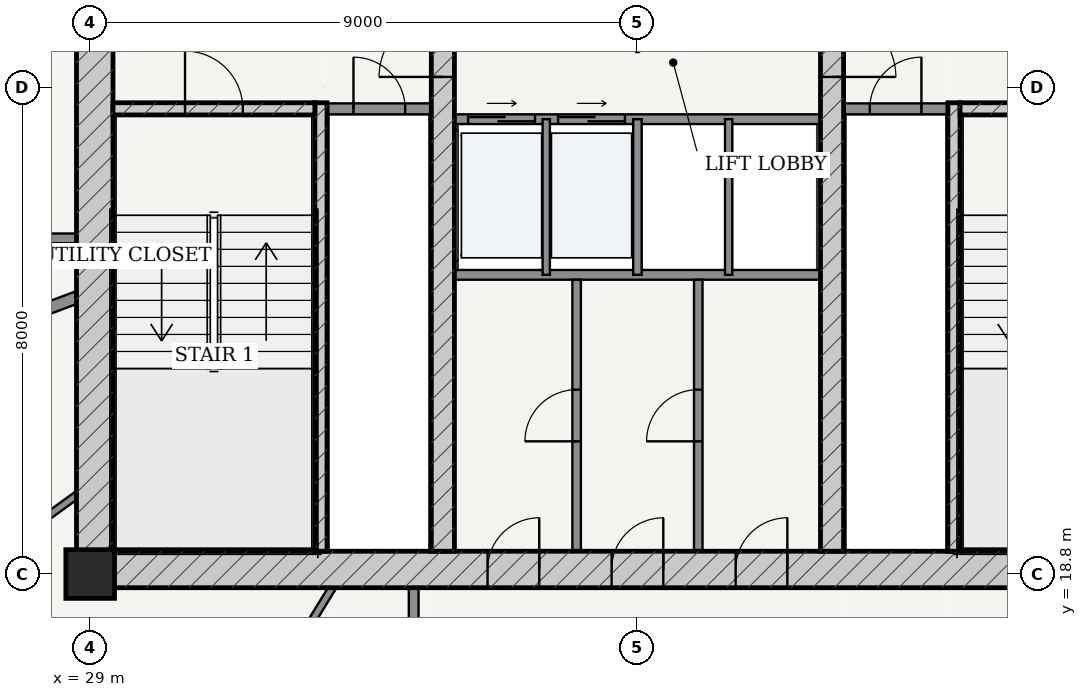
"""IFC4 building model, lengths in metres.
Left out: names, types, materials, properties, quantities, classifications, styles, units other than length and angle.
Written with IfcOpenShell. Run it as: python <this file> out.ifc"""

import sys

from ifc_helpers import new_model, si_unit, direction, frame, frame_2d, origin, origin_2d, place, context, subcontext, project, spatial, rectangle, extrude, source, transform, mapped, element, fill, save


model = new_model("IFC4")
c1 = context("Model", 3, precision=1e-05, world=origin(), true_north=direction((-0.2419218956, 0.970295726276)))
c2 = subcontext(c1, "Body", "Model", "MODEL_VIEW")
j1 = project(units=[si_unit("LENGTHUNIT", "METRE"), si_unit("PLANEANGLEUNIT", "RADIAN")], contexts=[c1])
p1 = place(None, origin())
s1 = spatial("IfcSite", under=j1, at=p1, CompositionType="ELEMENT")
p2 = place(p1, origin())
s2 = spatial("IfcBuilding", under=s1, at=p2, CompositionType="ELEMENT")
p3 = place(p2, frame((0.0, 0.0, 209.7)))
s3 = spatial("IfcBuildingStorey", under=s2, at=p3, CompositionType="ELEMENT", Elevation=209.7)
p4 = place(p3, frame((29.0, 18.8, 0.0), z_axis=(0.0, 0.0, 1.0), x_axis=(1.0, 0.0, 0.0)))
e1 = element("IfcColumn", 1, at=p4, inside=s3, PredefinedType="COLUMN", context=c2, shape_type="SweptSolid", body=[
    extrude(rectangle(XDim=0.8, YDim=0.8, at=origin_2d()), origin(), (0.0, 0.0, 1.0), 3.7),
])
p5 = place(p3, frame((28.775, 18.875, 0.0), z_axis=(0.0, 0.0, 1.0), x_axis=(1.0, 0.0, 0.0)))
e2 = element("IfcWall", 2, at=p5, inside=s3, PredefinedType="SHEAR", context=c2, shape_type="SweptSolid", body=[
    extrude(rectangle(XDim=18.45, YDim=0.6, at=frame_2d((9.225, 0.0))), origin(), (0.0, 0.0, 1.0), 3.435),
])
p6 = place(p5, frame((6.76, 0.0, 0.0)))
e3 = element("IfcOpeningElement", 3, at=p6, cuts=e2, PredefinedType="OPENING", context=c2, shape_type="SweptSolid", body=[
    extrude(rectangle(XDim=0.85, YDim=2.1, at=frame_2d((0.425, 1.05))), frame((0.0, 0.31, 0.0), z_axis=(0.0, -1.0, 0.0), x_axis=(1.0, 0.0, 0.0)), (0.0, 0.0, 1.0), 0.62),
])
p7 = place(p5, frame((8.8, 0.0, 0.0)))
e4 = element("IfcOpeningElement", 4, at=p7, cuts=e2, PredefinedType="OPENING", context=c2, shape_type="SweptSolid", body=[
    extrude(rectangle(XDim=0.85, YDim=2.1, at=frame_2d((0.425, 1.05))), frame((0.0, 0.31, 0.0), z_axis=(0.0, -1.0, 0.0), x_axis=(1.0, 0.0, 0.0)), (0.0, 0.0, 1.0), 0.62),
])
p8 = place(p5, frame((10.84, 0.0, 0.0)))
e5 = element("IfcOpeningElement", 5, at=p8, cuts=e2, PredefinedType="OPENING", context=c2, shape_type="SweptSolid", body=[
    extrude(rectangle(XDim=0.85, YDim=2.1, at=frame_2d((0.425, 1.05))), frame((0.0, 0.31, 0.0), z_axis=(0.0, -1.0, 0.0), x_axis=(1.0, 0.0, 0.0)), (0.0, 0.0, 1.0), 0.62),
])
p9 = place(p3, frame((29.075, 19.175, 0.0), z_axis=(0.0, 0.0, 1.0), x_axis=(0.0, 1.0, 0.0)))
e6 = element("IfcWall", 6, at=p9, inside=s3, PredefinedType="SHEAR", context=c2, shape_type="SweptSolid", body=[
    extrude(rectangle(XDim=15.25, YDim=0.6, at=frame_2d((7.625, 0.0))), origin(), (0.0, 0.0, 1.0), 3.435),
])
p10 = place(p9, frame((9.875, 0.0, 0.0)))
e7 = element("IfcOpeningElement", 7, at=p10, cuts=e6, PredefinedType="OPENING", context=c2, shape_type="SweptSolid", body=[
    extrude(rectangle(XDim=1.5, YDim=2.2, at=frame_2d((0.75, 1.1))), frame((0.0, 0.31, 0.0), z_axis=(0.0, -1.0, 0.0), x_axis=(1.0, 0.0, 0.0)), (0.0, 0.0, 1.0), 0.62),
])
p11 = place(p3, frame((32.795, 19.175, 0.0), z_axis=(0.0, 0.0, 1.0), x_axis=(0.0, 1.0, 0.0)))
e8 = element("IfcWall", 8, at=p11, inside=s3, PredefinedType="SOLIDWALL", context=c2, shape_type="SweptSolid", body=[
    extrude(rectangle(XDim=7.375, YDim=0.2, at=frame_2d((3.688, 0.0))), origin(), (0.0, 0.0, 1.0), 3.435),
])
p12 = place(p3, frame((29.375, 26.45, 0.0), z_axis=(0.0, 0.0, 1.0), x_axis=(1.0, 0.0, 0.0)))
e9 = element("IfcWall", 9, at=p12, inside=s3, PredefinedType="SOLIDWALL", context=c2, shape_type="SweptSolid", body=[
    extrude(rectangle(XDim=3.32, YDim=0.2, at=frame_2d((1.66, 0.0))), origin(), (0.0, 0.0, 1.0), 3.435),
])
p13 = place(p12, frame((1.185, 0.0, 0.0)))
e10 = element("IfcOpeningElement", 10, at=p13, cuts=e9, PredefinedType="OPENING", context=c2, shape_type="SweptSolid", body=[
    extrude(rectangle(XDim=0.95, YDim=2.15, at=frame_2d((0.475, 1.075))), frame((0.0, 0.11, 0.0), z_axis=(0.0, -1.0, 0.0), x_axis=(1.0, 0.0, 0.0)), (0.0, 0.0, 1.0), 0.22),
])
p14 = place(p3, frame((43.205, 19.175, 0.0), z_axis=(0.0, 0.0, 1.0), x_axis=(0.0, 1.0, 0.0)))
e11 = element("IfcWall", 11, at=p14, inside=s3, PredefinedType="SOLIDWALL", context=c2, shape_type="SweptSolid", body=[
    extrude(rectangle(XDim=7.375, YDim=0.2, at=frame_2d((3.688, 0.0))), origin(), (0.0, 0.0, 1.0), 3.435),
])
p15 = place(p3, frame((43.305, 26.45, 0.0), z_axis=(0.0, 0.0, 1.0), x_axis=(1.0, 0.0, 0.0)))
e12 = element("IfcWall", 12, at=p15, inside=s3, PredefinedType="SOLIDWALL", context=c2, shape_type="SweptSolid", body=[
    extrude(rectangle(XDim=3.32, YDim=0.2, at=frame_2d((1.66, 0.0))), origin(), (0.0, 0.0, 1.0), 3.435),
])
p16 = place(p15, frame((1.185, 0.0, 0.0)))
e13 = element("IfcOpeningElement", 13, at=p16, cuts=e12, PredefinedType="OPENING", context=c2, shape_type="SweptSolid", body=[
    extrude(rectangle(XDim=0.95, YDim=2.15, at=frame_2d((0.475, 1.075))), frame((0.0, 0.11, 0.0), z_axis=(0.0, -1.0, 0.0), x_axis=(1.0, 0.0, 0.0)), (0.0, 0.0, 1.0), 0.22),
])
p17 = place(p3, frame((34.8, 19.175, 0.0), z_axis=(0.0, 0.0, 1.0), x_axis=(0.0, 1.0, 0.0)))
e14 = element("IfcWall", 14, at=p17, inside=s3, PredefinedType="SHEAR", context=c2, shape_type="SweptSolid", body=[
    extrude(rectangle(XDim=15.25, YDim=0.38, at=frame_2d((7.625, 0.0))), origin(), (0.0, 0.0, 1.0), 3.435),
])
p18 = place(p17, frame((7.8, 0.0, 0.0)))
e15 = element("IfcOpeningElement", 15, at=p18, cuts=e14, PredefinedType="OPENING", context=c2, shape_type="SweptSolid", body=[
    extrude(rectangle(XDim=1.05, YDim=2.15, at=frame_2d((0.525, 1.075))), frame((0.0, 0.2, 0.0), z_axis=(0.0, -1.0, 0.0), x_axis=(1.0, 0.0, 0.0)), (0.0, 0.0, 1.0), 0.4),
])
p19 = place(p3, frame((41.2, 19.175, 0.0), z_axis=(0.0, 0.0, 1.0), x_axis=(0.0, 1.0, 0.0)))
e16 = element("IfcWall", 16, at=p19, inside=s3, PredefinedType="SHEAR", context=c2, shape_type="SweptSolid", body=[
    extrude(rectangle(XDim=15.25, YDim=0.38, at=frame_2d((7.625, 0.0))), origin(), (0.0, 0.0, 1.0), 3.435),
])
p20 = place(p19, frame((7.8, 0.0, 0.0)))
e17 = element("IfcOpeningElement", 17, at=p20, cuts=e16, PredefinedType="OPENING", context=c2, shape_type="SweptSolid", body=[
    extrude(rectangle(XDim=1.05, YDim=2.15, at=frame_2d((0.525, 1.075))), frame((0.0, 0.2, 0.0), z_axis=(0.0, -1.0, 0.0), x_axis=(1.0, 0.0, 0.0)), (0.0, 0.0, 1.0), 0.4),
])
p21 = place(p3, frame((32.9, 26.45, 0.0), z_axis=(0.0, 0.0, 1.0), x_axis=(1.0, 0.0, 0.0)))
e18 = element("IfcWall", 18, at=p21, inside=s3, PredefinedType="PARTITIONING", context=c2, shape_type="SweptSolid", body=[
    extrude(rectangle(XDim=1.71, YDim=0.18, at=frame_2d((0.855, 0.0))), origin(), (0.0, 0.0, 1.0), 3.435),
])
p22 = place(p21, frame((0.43, 0.0, 0.0)))
e19 = element("IfcOpeningElement", 19, at=p22, cuts=e18, PredefinedType="OPENING", context=c2, shape_type="SweptSolid", body=[
    extrude(rectangle(XDim=0.85, YDim=2.1, at=frame_2d((0.425, 1.05))), frame((0.0, 0.1, 0.0), z_axis=(0.0, -1.0, 0.0), x_axis=(1.0, 0.0, 0.0)), (0.0, 0.0, 1.0), 0.2),
])
p23 = place(p3, frame((41.39, 26.45, 0.0), z_axis=(0.0, 0.0, 1.0), x_axis=(1.0, 0.0, 0.0)))
e20 = element("IfcWall", 20, at=p23, inside=s3, PredefinedType="PARTITIONING", context=c2, shape_type="SweptSolid", body=[
    extrude(rectangle(XDim=1.71, YDim=0.18, at=frame_2d((0.855, 0.0))), origin(), (0.0, 0.0, 1.0), 3.435),
])
p24 = place(p23, frame((0.43, 0.0, 0.0)))
e21 = element("IfcOpeningElement", 21, at=p24, cuts=e20, PredefinedType="OPENING", context=c2, shape_type="SweptSolid", body=[
    extrude(rectangle(XDim=0.85, YDim=2.1, at=frame_2d((0.425, 1.05))), frame((0.0, 0.1, 0.0), z_axis=(0.0, -1.0, 0.0), x_axis=(1.0, 0.0, 0.0)), (0.0, 0.0, 1.0), 0.2),
])
p25 = place(p3, frame((34.99, 26.28, 0.0), z_axis=(0.0, 0.0, 1.0), x_axis=(1.0, 0.0, 0.0)))
e22 = element("IfcWall", 22, at=p25, inside=s3, PredefinedType="PARTITIONING", context=c2, shape_type="SweptSolid", body=[
    extrude(rectangle(XDim=6.02, YDim=0.16, at=frame_2d((3.01, 0.0))), origin(), (0.0, 0.0, 1.0), 3.435),
])
p26 = place(p25, frame((0.225, 0.0, 0.0)))
e23 = element("IfcOpeningElement", 23, at=p26, cuts=e22, PredefinedType="OPENING", context=c2, shape_type="SweptSolid", body=[
    extrude(rectangle(XDim=1.1, YDim=2.2, at=frame_2d((0.55, 1.1))), frame((0.0, 0.09, 0.0), z_axis=(0.0, -1.0, 0.0), x_axis=(1.0, 0.0, 0.0)), (0.0, 0.0, 1.0), 0.18),
])
p27 = place(p25, frame((1.705, 0.0, 0.0)))
e24 = element("IfcOpeningElement", 24, at=p27, cuts=e22, PredefinedType="OPENING", context=c2, shape_type="SweptSolid", body=[
    extrude(rectangle(XDim=1.1, YDim=2.2, at=frame_2d((0.55, 1.1))), frame((0.0, 0.09, 0.0), z_axis=(0.0, -1.0, 0.0), x_axis=(1.0, 0.0, 0.0)), (0.0, 0.0, 1.0), 0.18),
])
p28 = place(p3, frame((34.99, 23.72, 0.0), z_axis=(0.0, 0.0, 1.0), x_axis=(1.0, 0.0, 0.0)))
e25 = element("IfcWall", 25, at=p28, inside=s3, PredefinedType="PARTITIONING", context=c2, shape_type="SweptSolid", body=[
    extrude(rectangle(XDim=6.02, YDim=0.16, at=frame_2d((3.01, 0.0))), origin(), (0.0, 0.0, 1.0), 3.435),
])
p29 = place(p3, frame((36.5, 23.72, 0.0), z_axis=(0.0, 0.0, 1.0), x_axis=(0.0, 1.0, 0.0)))
e26 = element("IfcWall", 26, at=p29, inside=s3, PredefinedType="PARTITIONING", context=c2, shape_type="SweptSolid", body=[
    extrude(rectangle(XDim=2.56, YDim=0.12, at=frame_2d((1.28, 0.0))), origin(), (0.0, 0.0, 1.0), 3.435),
])
p30 = place(p3, frame((38.0, 23.72, 0.0), z_axis=(0.0, 0.0, 1.0), x_axis=(0.0, 1.0, 0.0)))
e27 = element("IfcWall", 27, at=p30, inside=s3, PredefinedType="PARTITIONING", context=c2, shape_type="SweptSolid", body=[
    extrude(rectangle(XDim=2.56, YDim=0.14, at=frame_2d((1.28, 0.0))), origin(), (0.0, 0.0, 1.0), 3.435),
])
p31 = place(p3, frame((39.5, 23.72, 0.0), z_axis=(0.0, 0.0, 1.0), x_axis=(0.0, 1.0, 0.0)))
e28 = element("IfcWall", 28, at=p31, inside=s3, PredefinedType="PARTITIONING", context=c2, shape_type="SweptSolid", body=[
    extrude(rectangle(XDim=2.56, YDim=0.12, at=frame_2d((1.28, 0.0))), origin(), (0.0, 0.0, 1.0), 3.435),
])
p32 = place(p3, frame((37.0, 19.175, 0.0), z_axis=(0.0, 0.0, 1.0), x_axis=(0.0, 1.0, 0.0)))
e29 = element("IfcWall", 29, at=p32, inside=s3, PredefinedType="PARTITIONING", context=c2, shape_type="SweptSolid", body=[
    extrude(rectangle(XDim=4.465, YDim=0.14, at=frame_2d((2.232, 0.0))), origin(), (0.0, 0.0, 1.0), 3.435),
])
p33 = place(p32, frame((1.808, 0.0, 0.0)))
e30 = element("IfcOpeningElement", 30, at=p33, cuts=e29, PredefinedType="OPENING", context=c2, shape_type="SweptSolid", body=[
    extrude(rectangle(XDim=0.85, YDim=2.1, at=frame_2d((0.425, 1.05))), frame((0.0, 0.08, 0.0), z_axis=(0.0, -1.0, 0.0), x_axis=(1.0, 0.0, 0.0)), (0.0, 0.0, 1.0), 0.16),
])
p34 = place(p3, frame((39.0, 19.175, 0.0), z_axis=(0.0, 0.0, 1.0), x_axis=(0.0, 1.0, 0.0)))
e31 = element("IfcWall", 31, at=p34, inside=s3, PredefinedType="PARTITIONING", context=c2, shape_type="SweptSolid", body=[
    extrude(rectangle(XDim=4.465, YDim=0.14, at=frame_2d((2.232, 0.0))), origin(), (0.0, 0.0, 1.0), 3.435),
])
p35 = place(p34, frame((1.808, 0.0, 0.0)))
e32 = element("IfcOpeningElement", 32, at=p35, cuts=e31, PredefinedType="OPENING", context=c2, shape_type="SweptSolid", body=[
    extrude(rectangle(XDim=0.85, YDim=2.1, at=frame_2d((0.425, 1.05))), frame((0.0, 0.08, 0.0), z_axis=(0.0, -1.0, 0.0), x_axis=(1.0, 0.0, 0.0)), (0.0, 0.0, 1.0), 0.16),
])
p36 = place(p3, frame((26.845, 24.32, 0.0), z_axis=(0.0, 0.0, 1.0), x_axis=(1.0, 0.0, 0.0)))
e33 = element("IfcWall", 33, at=p36, inside=s3, PredefinedType="PARTITIONING", context=c2, shape_type="SweptSolid", body=[
    extrude(rectangle(XDim=1.93, YDim=0.16, at=frame_2d((0.965, 0.0))), origin(), (0.0, 0.0, 1.0), 3.435),
])
p37 = place(p3, frame((34.32, 16.725, 0.0), z_axis=(0.0, 0.0, 1.0), x_axis=(0.0, 1.0, 0.0)))
e34 = element("IfcWall", 34, at=p37, inside=s3, PredefinedType="PARTITIONING", context=c2, shape_type="SweptSolid", body=[
    extrude(rectangle(XDim=1.85, YDim=0.16, at=frame_2d((0.925, 0.0))), origin(), (0.0, 0.0, 1.0), 3.435),
])
p38 = place(p3, frame((28.775, 23.347, 0.0), z_axis=(0.0, 0.0, 1.0), x_axis=(-0.936537569358, -0.350567227761, 0.0)))
e35 = element("IfcWall", 35, at=p38, inside=s3, PredefinedType="PARTITIONING", context=c2, shape_type="SweptSolid", body=[
    extrude(rectangle(XDim=11.594, YDim=0.2, at=frame_2d((5.797, 0.0))), origin(), (0.0, 0.0, 1.0), 2.951),
])
p39 = place(p3, frame((28.775, 20.094, 0.0), z_axis=(0.0, 0.0, 1.0), x_axis=(-0.808862864425, -0.587997335499, 0.0)))
e36 = element("IfcWall", 36, at=p39, inside=s3, PredefinedType="PARTITIONING", context=c2, shape_type="SweptSolid", body=[
    extrude(rectangle(XDim=2.831, YDim=0.12, at=frame_2d((1.416, 0.0))), origin(), (0.0, 0.0, 1.0), 3.435),
])
p40 = place(p3, frame((32.981, 18.575, 0.0), z_axis=(0.0, 0.0, 1.0), x_axis=(-0.520926540997, -0.853601510592, 0.0)))
e37 = element("IfcWall", 37, at=p40, inside=s3, PredefinedType="PARTITIONING", context=c2, shape_type="SweptSolid", body=[
    extrude(rectangle(XDim=2.679, YDim=0.12, at=frame_2d((1.34, 0.0))), origin(), (0.0, 0.0, 1.0), 3.435),
])
m1 = source(origin(), c2, "Body", "SweptSolid", [
    extrude(rectangle(XDim=1.05, YDim=2.15, at=frame_2d((0.525, 1.075))), frame((0.0, 0.025, 0.0), z_axis=(0.0, -1.0, 0.0), x_axis=(1.0, 0.0, 0.0)), (0.0, 0.0, 1.0), 0.05),
])
p41 = place(p18, origin())
e38 = element("IfcDoor", 38, at=p41, inside=s3, OperationType="SINGLE_SWING_LEFT", PredefinedType="DOOR", context=c2, shape_type="MappedRepresentation", body=[
    mapped(m1, transform((0.0, 0.0, 0.0), scale=1.0)),
])
fill(e15, e38)
p42 = place(p20, frame((1.05, 0.0, 0.0), z_axis=(0.0, 0.0, 1.0), x_axis=(-1.0, 0.0, 0.0)))
e39 = element("IfcDoor", 39, at=p42, inside=s3, OperationType="SINGLE_SWING_RIGHT", PredefinedType="DOOR", context=c2, shape_type="MappedRepresentation", body=[
    mapped(m1, transform((0.0, 0.0, 0.0), scale=1.0)),
])
fill(e17, e39)
m2 = source(origin(), c2, "Body", "SweptSolid", [
    extrude(rectangle(XDim=0.95, YDim=2.15, at=frame_2d((0.475, 1.075))), frame((0.0, 0.025, 0.0), z_axis=(0.0, -1.0, 0.0), x_axis=(1.0, 0.0, 0.0)), (0.0, 0.0, 1.0), 0.05),
])
p43 = place(p13, origin())
e40 = element("IfcDoor", 40, at=p43, inside=s3, OperationType="SINGLE_SWING_LEFT", PredefinedType="DOOR", context=c2, shape_type="MappedRepresentation", body=[
    mapped(m2, transform((0.0, 0.0, 0.0), scale=1.0)),
])
fill(e10, e40)
m3 = source(origin(), c2, "Body", "SweptSolid", [
    extrude(rectangle(XDim=0.85, YDim=2.1, at=frame_2d((0.425, 1.05))), frame((0.0, 0.025, 0.0), z_axis=(0.0, -1.0, 0.0), x_axis=(1.0, 0.0, 0.0)), (0.0, 0.0, 1.0), 0.05),
])
p44 = place(p22, origin())
e41 = element("IfcDoor", 41, at=p44, inside=s3, OperationType="SINGLE_SWING_LEFT", PredefinedType="DOOR", context=c2, shape_type="MappedRepresentation", body=[
    mapped(m3, transform((0.0, 0.0, 0.0), scale=1.0)),
])
fill(e19, e41)
p45 = place(p24, origin())
e42 = element("IfcDoor", 42, at=p45, inside=s3, OperationType="SINGLE_SWING_RIGHT", PredefinedType="DOOR", context=c2, shape_type="MappedRepresentation", body=[
    mapped(m3, transform((0.0, 0.0, 0.0), scale=1.0)),
])
fill(e21, e42)
p46 = place(p6, origin())
e43 = element("IfcDoor", 43, at=p46, inside=s3, OperationType="SINGLE_SWING_RIGHT", PredefinedType="DOOR", context=c2, shape_type="MappedRepresentation", body=[
    mapped(m3, transform((0.0, 0.0, 0.0), scale=1.0)),
])
fill(e3, e43)
p47 = place(p7, origin())
e44 = element("IfcDoor", 44, at=p47, inside=s3, OperationType="SINGLE_SWING_RIGHT", PredefinedType="DOOR", context=c2, shape_type="MappedRepresentation", body=[
    mapped(m3, transform((0.0, 0.0, 0.0), scale=1.0)),
])
fill(e4, e44)
p48 = place(p8, origin())
e45 = element("IfcDoor", 45, at=p48, inside=s3, OperationType="SINGLE_SWING_RIGHT", PredefinedType="DOOR", context=c2, shape_type="MappedRepresentation", body=[
    mapped(m3, transform((0.0, 0.0, 0.0), scale=1.0)),
])
fill(e5, e45)
p49 = place(p33, origin())
e46 = element("IfcDoor", 46, at=p49, inside=s3, OperationType="SINGLE_SWING_LEFT", PredefinedType="DOOR", context=c2, shape_type="MappedRepresentation", body=[
    mapped(m3, transform((0.0, 0.0, 0.0), scale=1.0)),
])
fill(e30, e46)
p50 = place(p35, origin())
e47 = element("IfcDoor", 47, at=p50, inside=s3, OperationType="SINGLE_SWING_LEFT", PredefinedType="DOOR", context=c2, shape_type="MappedRepresentation", body=[
    mapped(m3, transform((0.0, 0.0, 0.0), scale=1.0)),
])
fill(e32, e47)
m4 = source(origin(), c2, "Body", "SweptSolid", [
    extrude(rectangle(XDim=1.1, YDim=2.2, at=frame_2d((0.55, 1.1))), frame((0.0, 0.025, 0.0), z_axis=(0.0, -1.0, 0.0), x_axis=(1.0, 0.0, 0.0)), (0.0, 0.0, 1.0), 0.05),
])
p51 = place(p26, origin())
e48 = element("IfcDoor", 48, at=p51, inside=s3, OperationType="DOUBLE_DOOR_SLIDING", PredefinedType="DOOR", context=c2, shape_type="MappedRepresentation", body=[
    mapped(m4, transform((0.0, 0.0, 0.0), scale=1.0)),
])
fill(e23, e48)
p52 = place(p27, origin())
e49 = element("IfcDoor", 49, at=p52, inside=s3, OperationType="DOUBLE_DOOR_SLIDING", PredefinedType="DOOR", context=c2, shape_type="MappedRepresentation", body=[
    mapped(m4, transform((0.0, 0.0, 0.0), scale=1.0)),
])
fill(e24, e49)
save(model, sys.argv[1])
